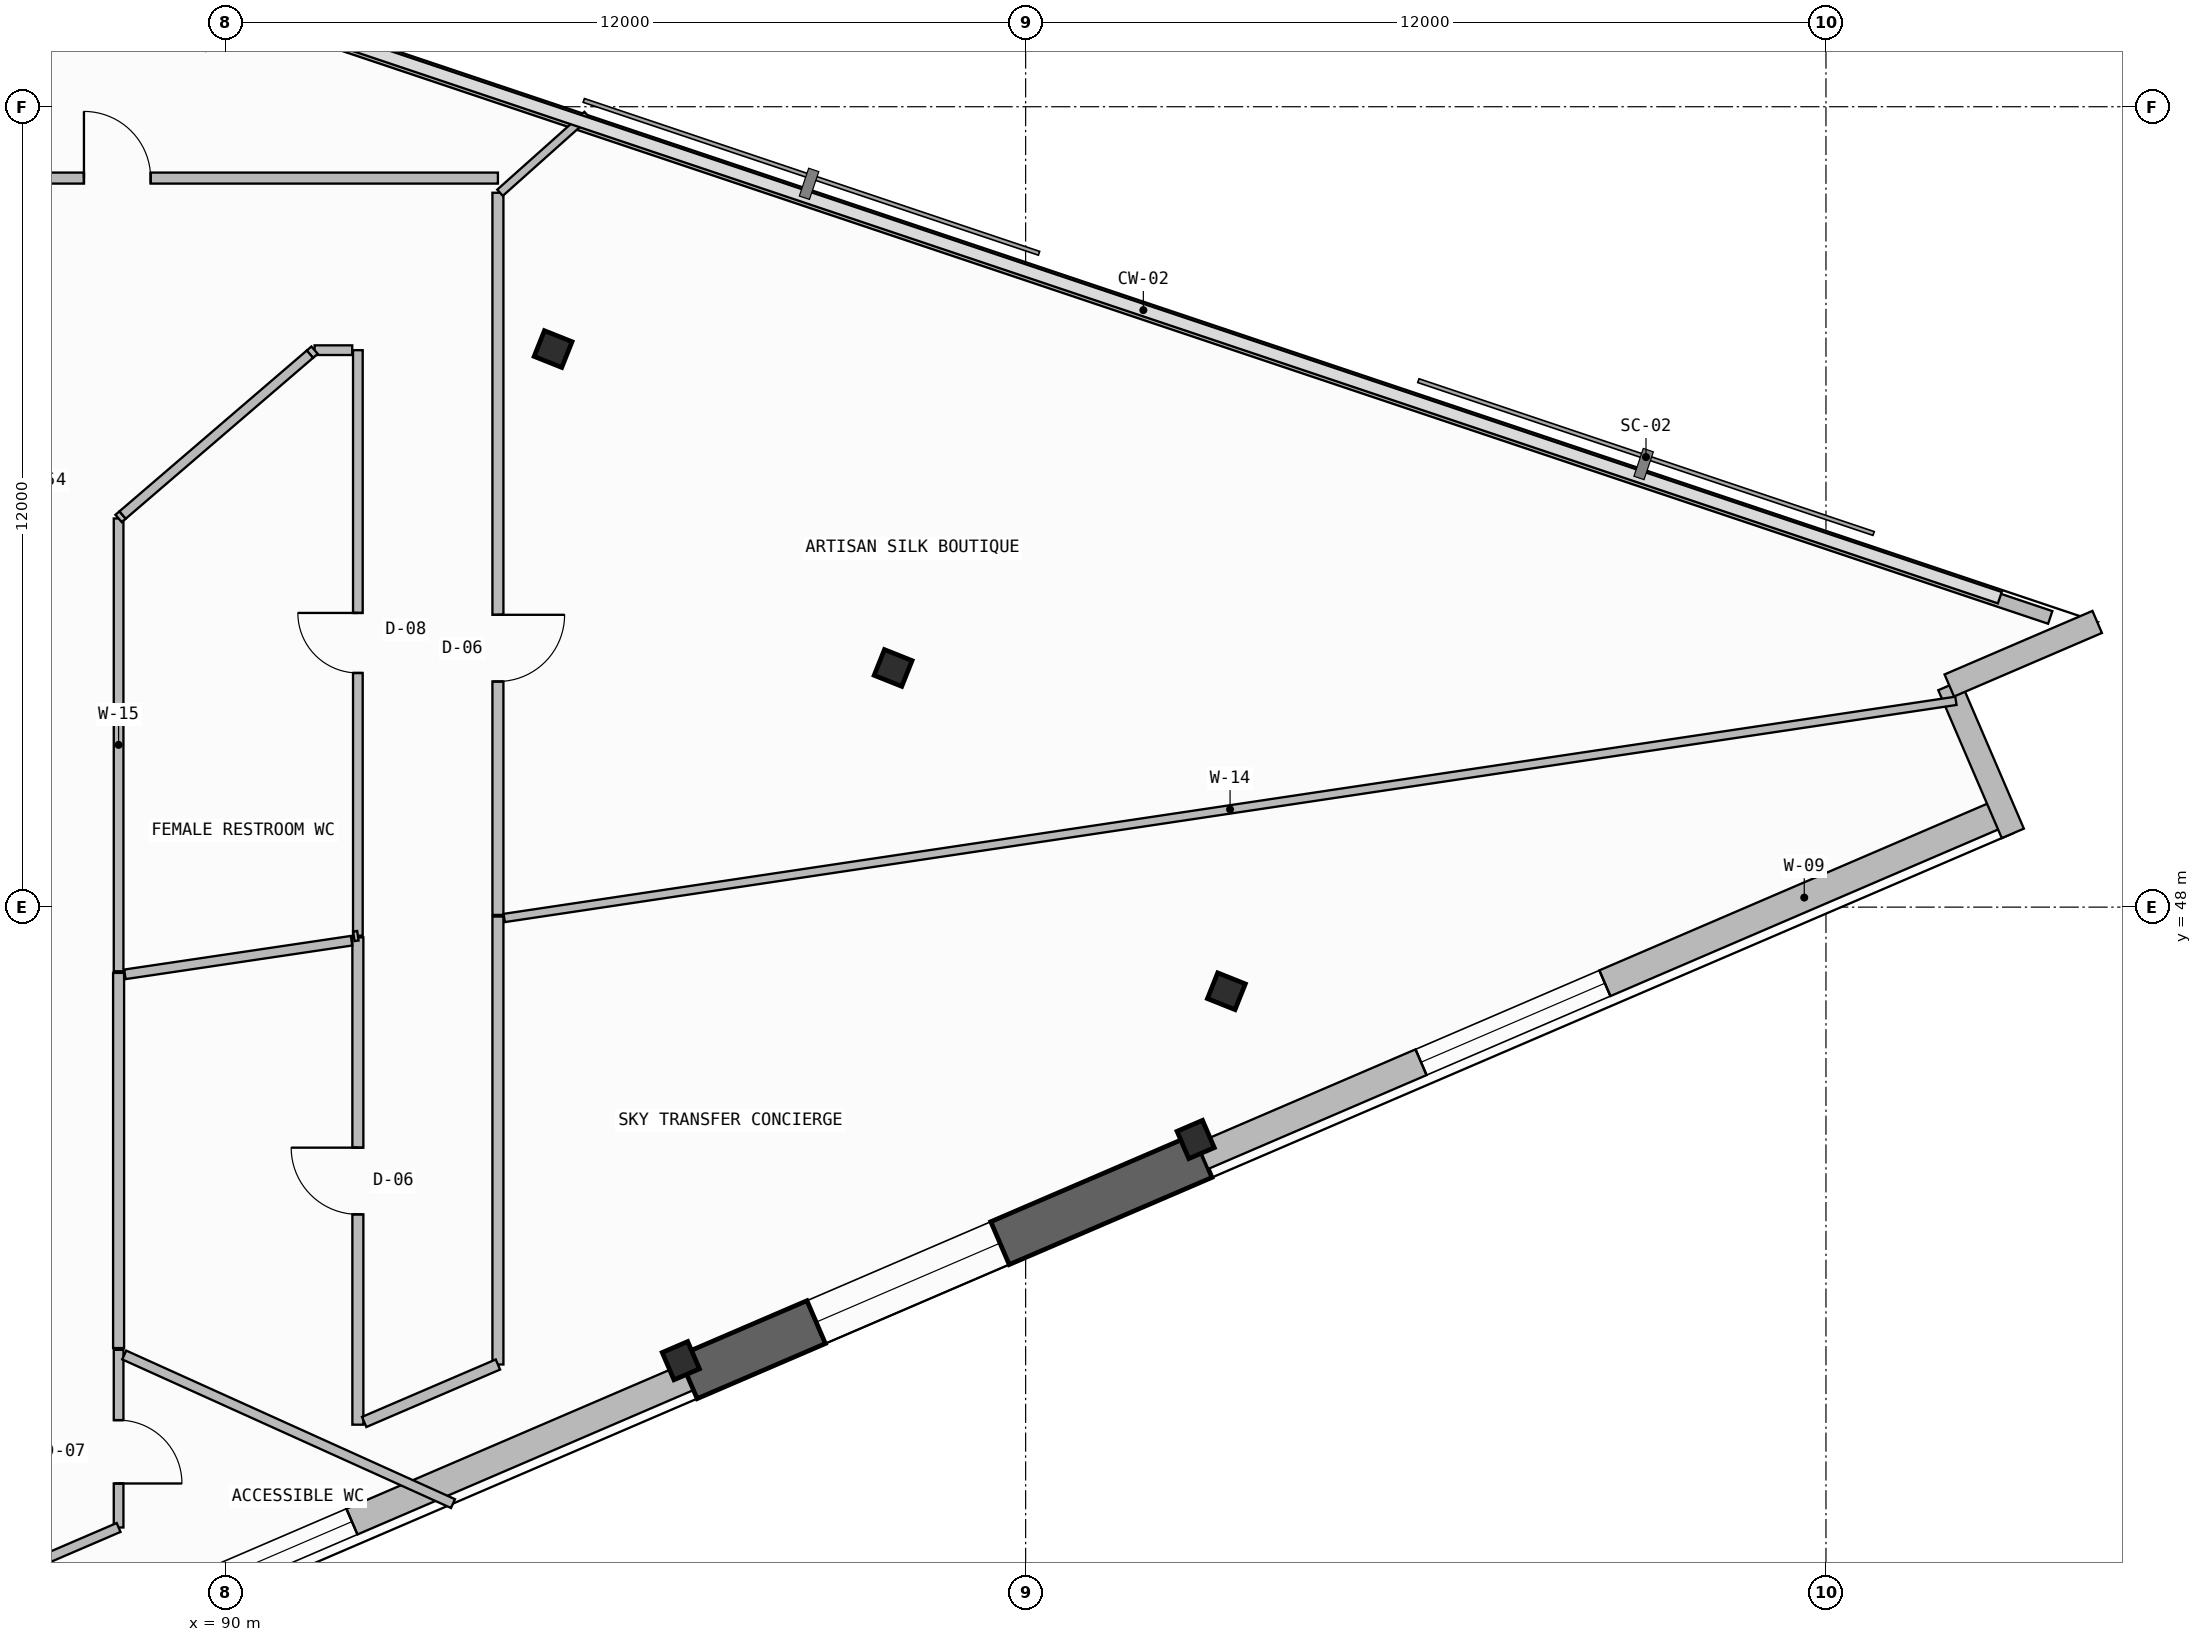
"""IFC4 building model, lengths in metres.
Left out: names, types, materials, properties, quantities, classifications, styles, units other than length and angle.
Written with IfcOpenShell. Run it as: python <this file> out.ifc"""

import sys

from ifc_helpers import new_model, si_unit, direction, frame, frame_2d, origin, origin_2d, place, context, subcontext, project, spatial, rectangle, i_section, extrude, element, fill, save


model = new_model("IFC4")
c1 = context("Model", 3, precision=1e-05, world=origin(), true_north=direction((0.0, 1.0)))
c2 = subcontext(c1, "Body", "Model", "MODEL_VIEW")
j1 = project(units=[si_unit("LENGTHUNIT", "METRE"), si_unit("PLANEANGLEUNIT", "RADIAN")], contexts=[c1])
p1 = place(None, origin())
s1 = spatial("IfcSite", under=j1, at=p1, CompositionType="ELEMENT")
p2 = place(p1, origin())
s2 = spatial("IfcBuilding", under=s1, at=p2, CompositionType="ELEMENT")
p3 = place(p2, frame((0.0, 0.0, 193.18)))
s3 = spatial("IfcBuildingStorey", under=s2, at=p3, CompositionType="ELEMENT", Elevation=193.18)
for number, where, z_axis, x_axis in (
    (1, (96.83, 41.2, 0.0), (0.0, 0.0, 1.0), (0.919, 0.395, 0.0)),
    (2, (104.549, 44.517, 0.0), (0.0, 0.0, 1.0), (0.919, 0.395, 0.0)),
    (3, (105.01, 46.739, 0.0), (0.0, 0.0, 1.0), (0.371, 0.929, 0.0)),
    (4, (100.013, 51.585, 0.0), (0.0, 0.0, 1.0), (0.371, 0.929, 0.0)),
    (5, (94.915, 56.367, 0.0), (0.0, 0.0, 1.0), (0.371, 0.929, 0.0)),
):
    element("IfcColumn", number, at=place(p3, frame(where, z_axis=z_axis, x_axis=x_axis)), inside=s3, PredefinedType="COLUMN", context=c2, shape_type="SweptSolid", body=[
        extrude(i_section(OverallWidth=0.416, OverallDepth=0.446, WebThickness=0.039, FlangeThickness=0.063, FilletRadius=0.015, at=origin_2d()), origin(), (0.0, 0.0, 1.0), 3.52),
    ])
p4 = place(p3, frame((86.1, 36.296, 0.0), z_axis=(0.0, 0.0, 1.0), x_axis=(0.918792412723, 0.394741057306, 0.0)))
e6 = element("IfcWall", 6, at=p4, inside=s3, PredefinedType="SOLIDWALL", context=c2, shape_type="SweptSolid", body=[
    extrude(rectangle(XDim=11.794, YDim=0.42, at=frame_2d((5.897, 0.0))), origin(), (0.0, 0.0, 1.0), 2.505),
])
p5 = place(p4, frame((3.311, 0.0, 1.2)))
e7 = element("IfcOpeningElement", 7, at=p5, cuts=e6, PredefinedType="OPENING", context=c2, shape_type="SweptSolid", body=[
    extrude(rectangle(XDim=3.0, YDim=0.9, at=frame_2d((1.5, 0.45))), frame((0.0, 0.22, 0.0), z_axis=(0.0, -1.0, 0.0), x_axis=(1.0, 0.0, 0.0)), (0.0, 0.0, 1.0), 0.44),
])
p6 = place(p3, frame((96.937, 40.952, -0.26), z_axis=(0.0, 0.0, 1.0), x_axis=(0.918782407933, 0.394764343468, 0.0)))
e8 = element("IfcWall", 8, at=p6, inside=s3, PredefinedType="SHEAR", context=c2, shape_type="SweptSolid", body=[
    extrude(rectangle(XDim=8.402, YDim=0.7, at=frame_2d((4.201, 0.0))), origin(), (0.0, 0.0, 1.0), 3.28),
])
p7 = place(p6, frame((2.093, 0.0, 1.2)))
e9 = element("IfcOpeningElement", 9, at=p7, cuts=e8, PredefinedType="OPENING", context=c2, shape_type="SweptSolid", body=[
    extrude(rectangle(XDim=3.0, YDim=0.9, at=frame_2d((1.5, 0.45))), frame((0.0, 0.36, 0.0), z_axis=(0.0, -1.0, 0.0), x_axis=(1.0, 0.0, 0.0)), (0.0, 0.0, 1.0), 0.72),
])
p8 = place(p3, frame((104.656, 44.269, 0.0), z_axis=(0.0, 0.0, 1.0), x_axis=(0.918789071809, 0.394748833467, 0.0)))
e10 = element("IfcWall", 10, at=p8, inside=s3, PredefinedType="SOLIDWALL", context=c2, shape_type="SweptSolid", body=[
    extrude(rectangle(XDim=13.069, YDim=0.42, at=frame_2d((6.534, 0.0))), origin(), (0.0, 0.0, 1.0), 3.02),
])
p9 = place(p8, frame((3.562, 0.0, 1.2)))
e11 = element("IfcOpeningElement", 11, at=p9, cuts=e10, PredefinedType="OPENING", context=c2, shape_type="SweptSolid", body=[
    extrude(rectangle(XDim=3.0, YDim=0.9, at=frame_2d((1.5, 0.45))), frame((0.0, 0.22, 0.0), z_axis=(0.0, -1.0, 0.0), x_axis=(1.0, 0.0, 0.0)), (0.0, 0.0, 1.0), 0.44),
])
p10 = place(p3, frame((116.802, 49.106, 0.0), z_axis=(0.0, 0.0, 1.0), x_axis=(-0.394712707157, 0.918804592288, 0.0)))
e12 = element("IfcWall", 12, at=p10, inside=s3, PredefinedType="SOLIDWALL", context=c2, shape_type="SweptSolid", body=[
    extrude(rectangle(XDim=2.414, YDim=0.36, at=frame_2d((1.207, 0.0))), origin(), (0.0, 0.0, 1.0), 3.02),
])
p11 = place(p3, frame((115.849, 51.323, 0.0), z_axis=(0.0, 0.0, 1.0), x_axis=(0.918788830096, 0.394749396062, 0.0)))
e13 = element("IfcWall", 13, at=p11, inside=s3, PredefinedType="SOLIDWALL", context=c2, shape_type="SweptSolid", body=[
    extrude(rectangle(XDim=2.413, YDim=0.36, at=frame_2d((1.207, 0.0))), origin(), (0.0, 0.0, 1.0), 3.02),
])
p12 = place(p3, frame((117.363, 52.344, 0.0), z_axis=(0.0, 0.0, 1.0), x_axis=(-0.94800468727, 0.31825636351, 0.0)))
e14 = element("IfcWall", 14, at=p12, inside=s3, PredefinedType="PARAPET", context=c2, shape_type="SweptSolid", body=[
    extrude(rectangle(XDim=31.869, YDim=0.2, at=frame_2d((15.935, 0.0))), origin(), (0.0, 0.0, 1.0), 1.15),
])
p13 = place(p3, frame((88.4, 38.699, 0.0), z_axis=(0.0, 0.0, 1.0), x_axis=(0.0, 1.0, 0.0)))
e15 = element("IfcWall", 15, at=p13, inside=s3, PredefinedType="PARTITIONING", context=c2, shape_type="SweptSolid", body=[
    extrude(rectangle(XDim=2.664, YDim=0.145, at=frame_2d((1.332, 0.0))), origin(), (0.0, 0.0, 1.0), 3.02),
])
p14 = place(p13, frame((0.66, 0.0, 0.0)))
e16 = element("IfcOpeningElement", 16, at=p14, cuts=e15, PredefinedType="OPENING", context=c2, shape_type="SweptSolid", body=[
    extrude(rectangle(XDim=0.95, YDim=2.15, at=frame_2d((0.475, 1.075))), frame((0.0, 0.083, 0.0), z_axis=(0.0, -1.0, 0.0), x_axis=(1.0, 0.0, 0.0)), (0.0, 0.0, 1.0), 0.165),
])
p15 = place(p3, frame((86.3, 37.797, 0.0), z_axis=(0.0, 0.0, 1.0), x_axis=(0.918802105609, 0.39471849555, 0.0)))
e17 = element("IfcWall", 17, at=p15, inside=s3, PredefinedType="PARTITIONING", context=c2, shape_type="SweptSolid", body=[
    extrude(rectangle(XDim=2.285, YDim=0.145, at=frame_2d((1.143, 0.0))), origin(), (0.0, 0.0, 1.0), 3.02),
])
p16 = place(p3, frame((88.485, 41.285, 0.0), z_axis=(0.0, 0.0, 1.0), x_axis=(0.911260799287, -0.411829765415, 0.0)))
e18 = element("IfcWall", 18, at=p16, inside=s3, PredefinedType="PARTITIONING", context=c2, shape_type="SweptSolid", body=[
    extrude(rectangle(XDim=5.409, YDim=0.145, at=frame_2d((2.705, 0.0))), origin(), (0.0, 0.0, 1.0), 3.02),
])
p17 = place(p3, frame((91.988, 47.547, 0.0), z_axis=(0.0, 0.0, 1.0), x_axis=(0.0, -1.0, 0.0)))
e19 = element("IfcWall", 19, at=p17, inside=s3, PredefinedType="PARTITIONING", context=c2, shape_type="SweptSolid", body=[
    extrude(rectangle(XDim=7.307, YDim=0.165, at=frame_2d((3.653, 0.0))), origin(), (0.0, 0.0, 1.0), 2.505),
])
p18 = place(p17, frame((3.153, 0.0, 0.0)))
e20 = element("IfcOpeningElement", 20, at=p18, cuts=e19, PredefinedType="OPENING", context=c2, shape_type="SweptSolid", body=[
    extrude(rectangle(XDim=1.0, YDim=2.2, at=frame_2d((0.5, 1.1))), frame((0.0, 0.093, 0.0), z_axis=(0.0, -1.0, 0.0), x_axis=(1.0, 0.0, 0.0)), (0.0, 0.0, 1.0), 0.185),
])
p19 = place(p3, frame((94.087, 41.143, 0.0), z_axis=(0.0, 0.0, 1.0), x_axis=(0.0, 1.0, 0.0)))
e21 = element("IfcWall", 21, at=p19, inside=s3, PredefinedType="PARTITIONING", context=c2, shape_type="SweptSolid", body=[
    extrude(rectangle(XDim=6.716, YDim=0.165, at=frame_2d((3.358, 0.0))), origin(), (0.0, 0.0, 1.0), 2.505),
])
p20 = place(p3, frame((88.4, 41.389, 0.0), z_axis=(0.0, 0.0, 1.0), x_axis=(0.0, 1.0, 0.0)))
e22 = element("IfcWall", 22, at=p20, inside=s3, PredefinedType="PARTITIONING", context=c2, shape_type="SweptSolid", body=[
    extrude(rectangle(XDim=5.625, YDim=0.165, at=frame_2d((2.812, 0.0))), origin(), (0.0, 0.0, 1.0), 2.505),
])
p21 = place(p3, frame((92.082, 40.281, 0.0), z_axis=(0.0, 0.0, 1.0), x_axis=(0.918791733635, 0.394742637935, 0.0)))
e23 = element("IfcWall", 23, at=p21, inside=s3, PredefinedType="PARTITIONING", context=c2, shape_type="SweptSolid", body=[
    extrude(rectangle(XDim=2.183, YDim=0.165, at=frame_2d((1.091, 0.0))), origin(), (0.0, 0.0, 1.0), 3.02),
])
p22 = place(p3, frame((94.182, 47.837, 0.0), z_axis=(0.0, 0.0, 1.0), x_axis=(0.988998268758, 0.147927091481, 0.0)))
e24 = element("IfcWall", 24, at=p22, inside=s3, PredefinedType="PARTITIONING", context=c2, shape_type="SweptSolid", body=[
    extrude(rectangle(XDim=22.008, YDim=0.125, at=frame_2d((11.004, 0.0))), origin(), (0.0, 0.0, 1.0), 2.605),
])
p23 = place(p3, frame((88.494, 46.992, 0.0), z_axis=(0.0, 0.0, 1.0), x_axis=(0.989176358179, 0.146731497711, 0.0)))
e25 = element("IfcWall", 25, at=p23, inside=s3, PredefinedType="PARTITIONING", context=c2, shape_type="SweptSolid", body=[
    extrude(rectangle(XDim=3.436, YDim=0.145, at=frame_2d((1.718, 0.0))), origin(), (0.0, 0.0, 1.0), 3.02),
])
p24 = place(p3, frame((94.087, 47.883, 0.0), z_axis=(0.0, 0.0, 1.0), x_axis=(0.0, 1.0, 0.0)))
e26 = element("IfcWall", 26, at=p24, inside=s3, PredefinedType="PARTITIONING", context=c2, shape_type="SweptSolid", body=[
    extrude(rectangle(XDim=10.827, YDim=0.165, at=frame_2d((5.414, 0.0))), origin(), (0.0, 0.0, 1.0), 2.405),
])
p25 = place(p24, frame((3.5, 0.0, 0.0)))
e27 = element("IfcOpeningElement", 27, at=p25, cuts=e26, PredefinedType="OPENING", context=c2, shape_type="SweptSolid", body=[
    extrude(rectangle(XDim=1.0, YDim=2.2, at=frame_2d((0.5, 1.1))), frame((0.0, 0.093, 0.0), z_axis=(0.0, -1.0, 0.0), x_axis=(1.0, 0.0, 0.0)), (0.0, 0.0, 1.0), 0.185),
])
p26 = place(p3, frame((94.119, 58.71, 0.0), z_axis=(0.0, 0.0, 1.0), x_axis=(0.745853553409, 0.66610995854, 0.0)))
e28 = element("IfcWall", 28, at=p26, inside=s3, PredefinedType="PARTITIONING", context=c2, shape_type="SweptSolid", body=[
    extrude(rectangle(XDim=1.751, YDim=0.125, at=frame_2d((0.875, 0.0))), origin(), (0.0, 0.0, 1.0), 3.02),
])
p27 = place(p3, frame((91.988, 56.35, 0.0), z_axis=(0.0, 0.0, 1.0), x_axis=(0.0, -1.0, 0.0)))
e29 = element("IfcWall", 29, at=p27, inside=s3, PredefinedType="PARTITIONING", context=c2, shape_type="SweptSolid", body=[
    extrude(rectangle(XDim=8.779, YDim=0.145, at=frame_2d((4.389, 0.0))), origin(), (0.0, 0.0, 1.0), 2.505),
])
p28 = place(p27, frame((3.939, 0.0, 0.0)))
e30 = element("IfcOpeningElement", 30, at=p28, cuts=e29, PredefinedType="OPENING", context=c2, shape_type="SweptSolid", body=[
    extrude(rectangle(XDim=0.9, YDim=2.1, at=frame_2d((0.45, 1.05))), frame((0.0, 0.083, 0.0), z_axis=(0.0, -1.0, 0.0), x_axis=(1.0, 0.0, 0.0)), (0.0, 0.0, 1.0), 0.165),
])
p29 = place(p3, frame((88.4, 47.038, 0.0), z_axis=(0.0, 0.0, 1.0), x_axis=(0.0, 1.0, 0.0)))
e31 = element("IfcWall", 31, at=p29, inside=s3, PredefinedType="PARTITIONING", context=c2, shape_type="SweptSolid", body=[
    extrude(rectangle(XDim=6.789, YDim=0.145, at=frame_2d((3.394, 0.0))), origin(), (0.0, 0.0, 1.0), 3.02),
])
p30 = place(p3, frame((91.338, 56.35, 0.0), z_axis=(0.0, 0.0, 1.0), x_axis=(1.0, 0.0, 0.0)))
e32 = element("IfcWall", 32, at=p30, inside=s3, PredefinedType="PARTITIONING", context=c2, shape_type="SweptSolid", body=[
    extrude(rectangle(XDim=0.565, YDim=0.145, at=frame_2d((0.282, 0.0))), origin(), (0.0, 0.0, 1.0), 2.505),
])
p31 = place(p3, frame((91.269, 56.29, 0.0), z_axis=(0.0, 0.0, 1.0), x_axis=(0.757002151441, 0.653412383349, 0.0)))
e33 = element("IfcWall", 33, at=p31, inside=s3, PredefinedType="PARTITIONING", context=c2, shape_type="SweptSolid", body=[
    extrude(rectangle(XDim=0.092, YDim=0.145, at=frame_2d((0.046, 0.0))), origin(), (0.0, 0.0, 1.0), 2.505),
])
p32 = place(p3, frame((88.4, 53.827, 0.0), z_axis=(0.0, 0.0, 1.0), x_axis=(0.759038758193, 0.651045438938, 0.0)))
e34 = element("IfcWall", 34, at=p32, inside=s3, PredefinedType="PARTITIONING", context=c2, shape_type="SweptSolid", body=[
    extrude(rectangle(XDim=0.079, YDim=0.145, at=frame_2d((0.04, 0.0))), origin(), (0.0, 0.0, 1.0), 3.02),
])
p33 = place(p3, frame((91.988, 47.571, 0.0), z_axis=(0.0, 0.0, 1.0), x_axis=(-0.988877304166, -0.148733578269, 0.0)))
e35 = element("IfcWall", 35, at=p33, inside=s3, PredefinedType="PARTITIONING", context=c2, shape_type="SweptSolid", body=[
    extrude(rectangle(XDim=0.061, YDim=0.145, at=frame_2d((0.03, 0.0))), origin(), (0.0, 0.0, 1.0), 3.02),
])
p34 = place(p3, frame((94.087, 58.93, 0.0), z_axis=(0.0, 0.0, 1.0), x_axis=(-1.0, 0.0, 0.0)))
e36 = element("IfcWall", 36, at=p34, inside=s3, PredefinedType="PARTITIONING", context=c2, shape_type="SweptSolid", body=[
    extrude(rectangle(XDim=15.706, YDim=0.165, at=frame_2d((7.853, 0.0))), origin(), (0.0, 0.0, 1.0), 2.405),
])
p35 = place(p34, frame((5.207, 0.0, 0.0)))
e37 = element("IfcOpeningElement", 37, at=p35, cuts=e36, PredefinedType="OPENING", context=c2, shape_type="SweptSolid", body=[
    extrude(rectangle(XDim=1.0, YDim=2.2, at=frame_2d((0.5, 1.1))), frame((0.0, 0.093, 0.0), z_axis=(0.0, -1.0, 0.0), x_axis=(1.0, 0.0, 0.0)), (0.0, 0.0, 1.0), 0.185),
])
p36 = place(p3, frame((88.46, 53.878, 0.0), z_axis=(0.0, 0.0, 1.0), x_axis=(0.758716354213, 0.651421134021, 0.0)))
e38 = element("IfcWall", 38, at=p36, inside=s3, PredefinedType="PARTITIONING", context=c2, shape_type="SweptSolid", body=[
    extrude(rectangle(XDim=3.702, YDim=0.145, at=frame_2d((1.851, 0.0))), origin(), (0.0, 0.0, 1.0), 2.505),
])
p37 = place(p5, origin())
e39 = element("IfcWindow", 39, at=p37, inside=s3, PartitioningType="SINGLE_PANEL", PredefinedType="WINDOW", context=c2, shape_type="SweptSolid", body=[
    extrude(rectangle(XDim=3.0, YDim=0.9, at=frame_2d((1.5, 0.45))), frame((0.0, 0.03, 0.0), z_axis=(0.0, -1.0, 0.0), x_axis=(1.0, 0.0, 0.0)), (0.0, 0.0, 1.0), 0.06),
])
fill(e7, e39)
p38 = place(p7, origin())
e40 = element("IfcWindow", 40, at=p38, inside=s3, PartitioningType="SINGLE_PANEL", PredefinedType="WINDOW", context=c2, shape_type="SweptSolid", body=[
    extrude(rectangle(XDim=3.0, YDim=0.9, at=frame_2d((1.5, 0.45))), frame((0.0, 0.03, 0.0), z_axis=(0.0, -1.0, 0.0), x_axis=(1.0, 0.0, 0.0)), (0.0, 0.0, 1.0), 0.06),
])
fill(e9, e40)
p39 = place(p9, origin())
e41 = element("IfcWindow", 41, at=p39, inside=s3, PartitioningType="SINGLE_PANEL", PredefinedType="WINDOW", context=c2, shape_type="SweptSolid", body=[
    extrude(rectangle(XDim=3.0, YDim=0.9, at=frame_2d((1.5, 0.45))), frame((0.0, 0.03, 0.0), z_axis=(0.0, -1.0, 0.0), x_axis=(1.0, 0.0, 0.0)), (0.0, 0.0, 1.0), 0.06),
])
fill(e11, e41)
p40 = place(p14, frame((0.95, 0.0, 0.0), z_axis=(0.0, 0.0, 1.0), x_axis=(-1.0, 0.0, 0.0)))
e42 = element("IfcDoor", 42, at=p40, inside=s3, OperationType="SINGLE_SWING_RIGHT", PredefinedType="DOOR", context=c2, shape_type="SweptSolid", body=[
    extrude(rectangle(XDim=0.95, YDim=2.15, at=frame_2d((0.475, 1.075))), frame((0.0, 0.025, 0.0), z_axis=(0.0, -1.0, 0.0), x_axis=(1.0, 0.0, 0.0)), (0.0, 0.0, 1.0), 0.05),
])
fill(e16, e42)
p41 = place(p18, frame((1.0, 0.0, 0.0), z_axis=(0.0, 0.0, 1.0), x_axis=(-1.0, 0.0, 0.0)))
e43 = element("IfcDoor", 43, at=p41, inside=s3, OperationType="SINGLE_SWING_RIGHT", PredefinedType="DOOR", context=c2, shape_type="SweptSolid", body=[
    extrude(rectangle(XDim=1.0, YDim=2.2, at=frame_2d((0.5, 1.1))), frame((0.0, 0.025, 0.0), z_axis=(0.0, -1.0, 0.0), x_axis=(1.0, 0.0, 0.0)), (0.0, 0.0, 1.0), 0.05),
])
fill(e20, e43)
p42 = place(p25, frame((1.0, 0.0, 0.0), z_axis=(0.0, 0.0, 1.0), x_axis=(-1.0, 0.0, 0.0)))
e44 = element("IfcDoor", 44, at=p42, inside=s3, OperationType="SINGLE_SWING_LEFT", PredefinedType="DOOR", context=c2, shape_type="SweptSolid", body=[
    extrude(rectangle(XDim=1.0, YDim=2.2, at=frame_2d((0.5, 1.1))), frame((0.0, 0.025, 0.0), z_axis=(0.0, -1.0, 0.0), x_axis=(1.0, 0.0, 0.0)), (0.0, 0.0, 1.0), 0.05),
])
fill(e27, e44)
p43 = place(p28, frame((0.9, 0.0, 0.0), z_axis=(0.0, 0.0, 1.0), x_axis=(-1.0, 0.0, 0.0)))
e45 = element("IfcDoor", 45, at=p43, inside=s3, OperationType="SINGLE_SWING_RIGHT", PredefinedType="DOOR", context=c2, shape_type="SweptSolid", body=[
    extrude(rectangle(XDim=0.9, YDim=2.1, at=frame_2d((0.45, 1.05))), frame((0.0, 0.025, 0.0), z_axis=(0.0, -1.0, 0.0), x_axis=(1.0, 0.0, 0.0)), (0.0, 0.0, 1.0), 0.05),
])
fill(e30, e45)
p44 = place(p35, frame((1.0, 0.0, 0.0), z_axis=(0.0, 0.0, 1.0), x_axis=(-1.0, 0.0, 0.0)))
e46 = element("IfcDoor", 46, at=p44, inside=s3, OperationType="SINGLE_SWING_LEFT", PredefinedType="DOOR", context=c2, shape_type="SweptSolid", body=[
    extrude(rectangle(XDim=1.0, YDim=2.2, at=frame_2d((0.5, 1.1))), frame((0.0, 0.025, 0.0), z_axis=(0.0, -1.0, 0.0), x_axis=(1.0, 0.0, 0.0)), (0.0, 0.0, 1.0), 0.05),
])
fill(e37, e46)
save(model, sys.argv[1])
